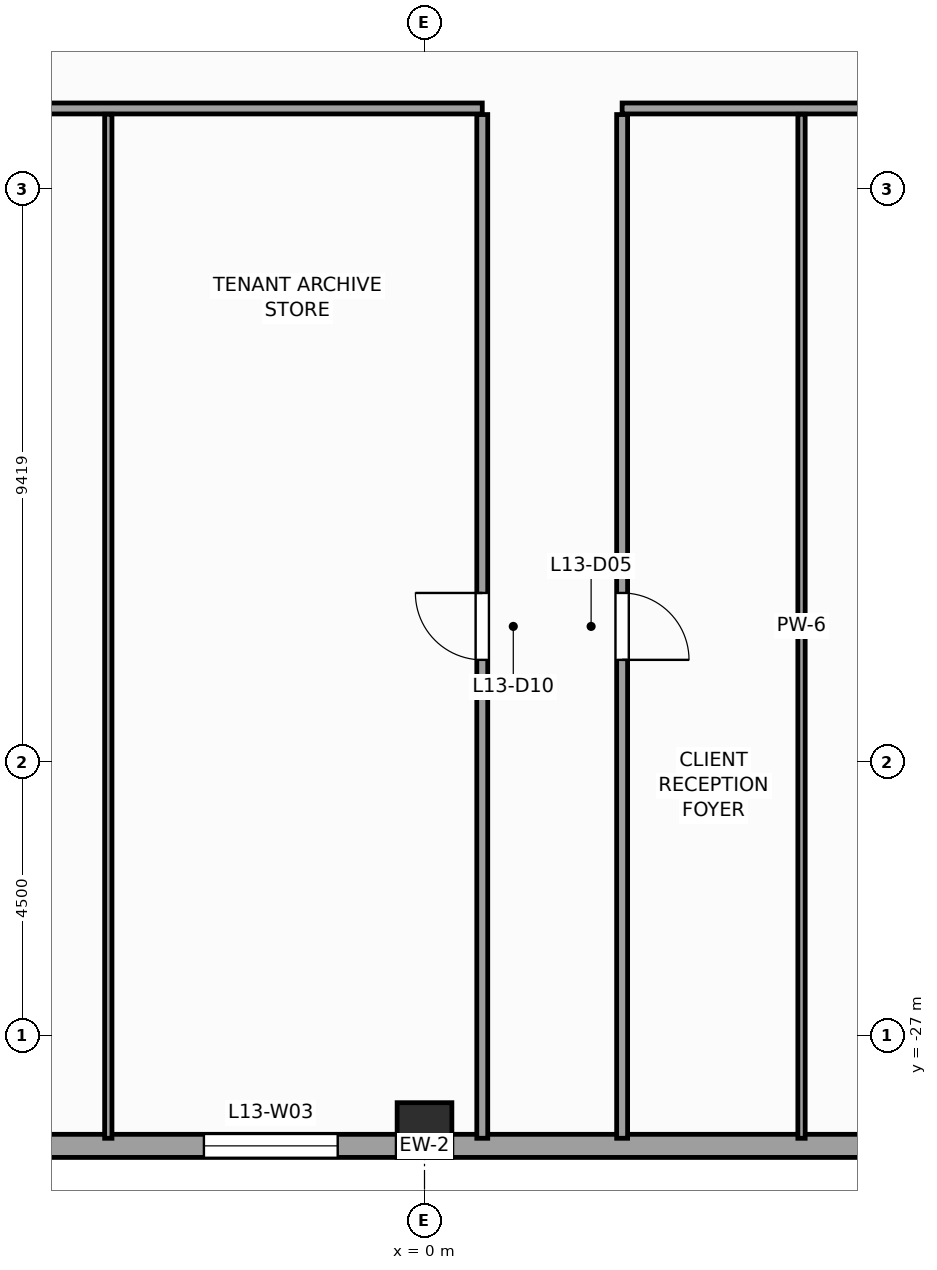
"""IFC4 building model, lengths in metres.
Left out: names, types, materials, properties, quantities, classifications, styles, units other than length and angle.
Written with IfcOpenShell. Run it as: python <this file> out.ifc"""

import sys

from ifc_helpers import new_model, si_unit, direction, frame, frame_2d, origin, origin_2d, place, context, subcontext, project, spatial, rectangle, extrude, source, transform, mapped, element, fill, save


model = new_model("IFC4")
c1 = context("Model", 3, precision=1e-05, world=origin(), true_north=direction((0.0, 1.0)))
c2 = subcontext(c1, "Body", "Model", "MODEL_VIEW")
j1 = project(units=[si_unit("LENGTHUNIT", "METRE"), si_unit("PLANEANGLEUNIT", "RADIAN")], contexts=[c1])
p1 = place(None, origin())
s1 = spatial("IfcSite", under=j1, at=p1, CompositionType="ELEMENT")
p2 = place(p1, origin())
s2 = spatial("IfcBuilding", under=s1, at=p2, CompositionType="ELEMENT")
p3 = place(p2, frame((0.0, 0.0, 58.0)))
s3 = spatial("IfcBuildingStorey", under=s2, at=p3, CompositionType="ELEMENT", Elevation=58.0)
m1 = source(origin(), c2, "Body", "SweptSolid", [
    extrude(rectangle(XDim=0.9, YDim=0.9, at=origin_2d()), origin(), (0.0, 0.0, 1.0), 4.0),
])
p4 = place(p3, frame((0.0, -28.55, 0.0), z_axis=(0.0, 0.0, 1.0), x_axis=(1.0, 0.0, 0.0)))
e1 = element("IfcColumn", 1, at=p4, inside=s3, PredefinedType="COLUMN", context=c2, shape_type="MappedRepresentation", body=[
    mapped(m1, transform((0.0, 0.0, 0.0), scale=1.0)),
])
p5 = place(p3, frame((-25.69, -28.81, 0.0), z_axis=(0.0, 0.0, 1.0), x_axis=(1.0, 0.0, 0.0)))
e2 = element("IfcWall", 2, at=p5, inside=s3, PredefinedType="STANDARD", context=c2, shape_type="SweptSolid", body=[
    extrude(rectangle(XDim=51.38, YDim=0.38, at=frame_2d((25.69, 0.0))), origin(), (0.0, 0.0, 1.0), 3.12),
])
p6 = place(p5, frame((5.466, 0.0, 0.49)))
e3 = element("IfcOpeningElement", 3, at=p6, cuts=e2, PredefinedType="OPENING", context=c2, shape_type="SweptSolid", body=[
    extrude(rectangle(XDim=1.4, YDim=2.4, at=frame_2d((0.7, 1.2))), frame((0.0, 0.2, 0.0), z_axis=(0.0, -1.0, 0.0), x_axis=(1.0, 0.0, 0.0)), (0.0, 0.0, 1.0), 0.4),
])
p7 = place(p5, frame((13.8, 0.0, 0.49)))
e4 = element("IfcOpeningElement", 4, at=p7, cuts=e2, PredefinedType="OPENING", context=c2, shape_type="SweptSolid", body=[
    extrude(rectangle(XDim=2.2, YDim=2.4, at=frame_2d((1.1, 1.2))), frame((0.0, 0.2, 0.0), z_axis=(0.0, -1.0, 0.0), x_axis=(1.0, 0.0, 0.0)), (0.0, 0.0, 1.0), 0.4),
])
p8 = place(p5, frame((22.062, 0.0, 0.49)))
e5 = element("IfcOpeningElement", 5, at=p8, cuts=e2, PredefinedType="OPENING", context=c2, shape_type="SweptSolid", body=[
    extrude(rectangle(XDim=2.2, YDim=2.4, at=frame_2d((1.1, 1.2))), frame((0.0, 0.2, 0.0), z_axis=(0.0, -1.0, 0.0), x_axis=(1.0, 0.0, 0.0)), (0.0, 0.0, 1.0), 0.4),
])
p9 = place(p5, frame((33.838, 0.0, 0.49)))
e6 = element("IfcOpeningElement", 6, at=p9, cuts=e2, PredefinedType="OPENING", context=c2, shape_type="SweptSolid", body=[
    extrude(rectangle(XDim=2.2, YDim=2.4, at=frame_2d((1.1, 1.2))), frame((0.0, 0.2, 0.0), z_axis=(0.0, -1.0, 0.0), x_axis=(1.0, 0.0, 0.0)), (0.0, 0.0, 1.0), 0.4),
])
p10 = place(p5, frame((43.487, 0.0, 0.49)))
e7 = element("IfcOpeningElement", 7, at=p10, cuts=e2, PredefinedType="OPENING", context=c2, shape_type="SweptSolid", body=[
    extrude(rectangle(XDim=1.4, YDim=2.4, at=frame_2d((0.7, 1.2))), frame((0.0, 0.2, 0.0), z_axis=(0.0, -1.0, 0.0), x_axis=(1.0, 0.0, 0.0)), (0.0, 0.0, 1.0), 0.4),
])
p11 = place(p3, frame((-11.75, -11.75, 0.0), z_axis=(0.0, 0.0, 1.0), x_axis=(1.0, 0.0, 0.0)))
e8 = element("IfcWall", 8, at=p11, inside=s3, PredefinedType="PARTITIONING", context=c2, shape_type="SweptSolid", body=[
    extrude(rectangle(XDim=12.7, YDim=0.18, at=frame_2d((6.35, 0.0))), origin(), (0.0, 0.0, 1.0), 3.72),
])
p12 = place(p3, frame((3.25, -11.75, 0.0), z_axis=(0.0, 0.0, 1.0), x_axis=(1.0, 0.0, 0.0)))
e9 = element("IfcWall", 9, at=p12, inside=s3, PredefinedType="PARTITIONING", context=c2, shape_type="SweptSolid", body=[
    extrude(rectangle(XDim=7.35, YDim=0.18, at=frame_2d((3.675, 0.0))), origin(), (0.0, 0.0, 1.0), 3.72),
])
p13 = place(p3, frame((0.95, -28.685, 0.0), z_axis=(0.0, 0.0, 1.0), x_axis=(0.0, 1.0, 0.0)))
e10 = element("IfcWall", 10, at=p13, inside=s3, PredefinedType="PARTITIONING", context=c2, shape_type="SweptSolid", body=[
    extrude(rectangle(XDim=16.835, YDim=0.18, at=frame_2d((8.417, 0.0))), origin(), (0.0, 0.0, 1.0), 3.72),
])
p14 = place(p13, frame((7.867, 0.0, 0.0)))
e11 = element("IfcOpeningElement", 11, at=p14, cuts=e10, PredefinedType="OPENING", context=c2, shape_type="SweptSolid", body=[
    extrude(rectangle(XDim=1.1, YDim=2.2, at=frame_2d((0.55, 1.1))), frame((0.0, 0.1, 0.0), z_axis=(0.0, -1.0, 0.0), x_axis=(1.0, 0.0, 0.0)), (0.0, 0.0, 1.0), 0.2),
])
p15 = place(p3, frame((3.25, -28.685, 0.0), z_axis=(0.0, 0.0, 1.0), x_axis=(0.0, 1.0, 0.0)))
e12 = element("IfcWall", 12, at=p15, inside=s3, PredefinedType="PARTITIONING", context=c2, shape_type="SweptSolid", body=[
    extrude(rectangle(XDim=16.835, YDim=0.18, at=frame_2d((8.417, 0.0))), origin(), (0.0, 0.0, 1.0), 3.39),
])
p16 = place(p15, frame((7.867, 0.0, 0.0)))
e13 = element("IfcOpeningElement", 13, at=p16, cuts=e12, PredefinedType="OPENING", context=c2, shape_type="SweptSolid", body=[
    extrude(rectangle(XDim=1.1, YDim=2.2, at=frame_2d((0.55, 1.1))), frame((0.0, 0.1, 0.0), z_axis=(0.0, -1.0, 0.0), x_axis=(1.0, 0.0, 0.0)), (0.0, 0.0, 1.0), 0.2),
])
for number, where, z_axis, x_axis in (
    (14, (6.2, -28.685, 0.0), (0.0, 0.0, 1.0), (0.0, 1.0, 0.0)),
    (15, (-5.2, -28.685, 0.0), (0.0, 0.0, 1.0), (0.0, 1.0, 0.0)),
):
    element("IfcWall", number, at=place(p3, frame(where, z_axis=z_axis, x_axis=x_axis)), inside=s3, PredefinedType="PARTITIONING", context=c2, shape_type="SweptSolid", body=[
        extrude(rectangle(XDim=16.84, YDim=0.12, at=frame_2d((8.42, 0.0))), origin(), (0.0, 0.0, 1.0), 3.72),
    ])
m2 = source(origin(), c2, "Body", "SweptSolid", [
    extrude(rectangle(XDim=2.2, YDim=2.4, at=frame_2d((1.1, 1.2))), frame((0.0, 0.03, 0.0), z_axis=(0.0, -1.0, 0.0), x_axis=(1.0, 0.0, 0.0)), (0.0, 0.0, 1.0), 0.06),
])
p17 = place(p8, origin())
e16 = element("IfcWindow", 16, at=p17, inside=s3, PartitioningType="SINGLE_PANEL", PredefinedType="WINDOW", context=c2, shape_type="MappedRepresentation", body=[
    mapped(m2, transform((0.0, 0.0, 0.0), scale=1.0)),
])
fill(e5, e16)
m3 = source(origin(), c2, "Body", "SweptSolid", [
    extrude(rectangle(XDim=1.1, YDim=2.2, at=frame_2d((0.55, 1.1))), frame((0.0, 0.025, 0.0), z_axis=(0.0, -1.0, 0.0), x_axis=(1.0, 0.0, 0.0)), (0.0, 0.0, 1.0), 0.05),
])
p18 = place(p16, frame((1.1, 0.0, 0.0), z_axis=(0.0, 0.0, 1.0), x_axis=(-1.0, 0.0, 0.0)))
e17 = element("IfcDoor", 17, at=p18, inside=s3, OperationType="SINGLE_SWING_LEFT", PredefinedType="DOOR", context=c2, shape_type="MappedRepresentation", body=[
    mapped(m3, transform((0.0, 0.0, 0.0), scale=1.0)),
])
fill(e13, e17)
p19 = place(p14, origin())
e18 = element("IfcDoor", 18, at=p19, inside=s3, OperationType="SINGLE_SWING_RIGHT", PredefinedType="DOOR", context=c2, shape_type="MappedRepresentation", body=[
    mapped(m3, transform((0.0, 0.0, 0.0), scale=1.0)),
])
fill(e11, e18)
save(model, sys.argv[1])
